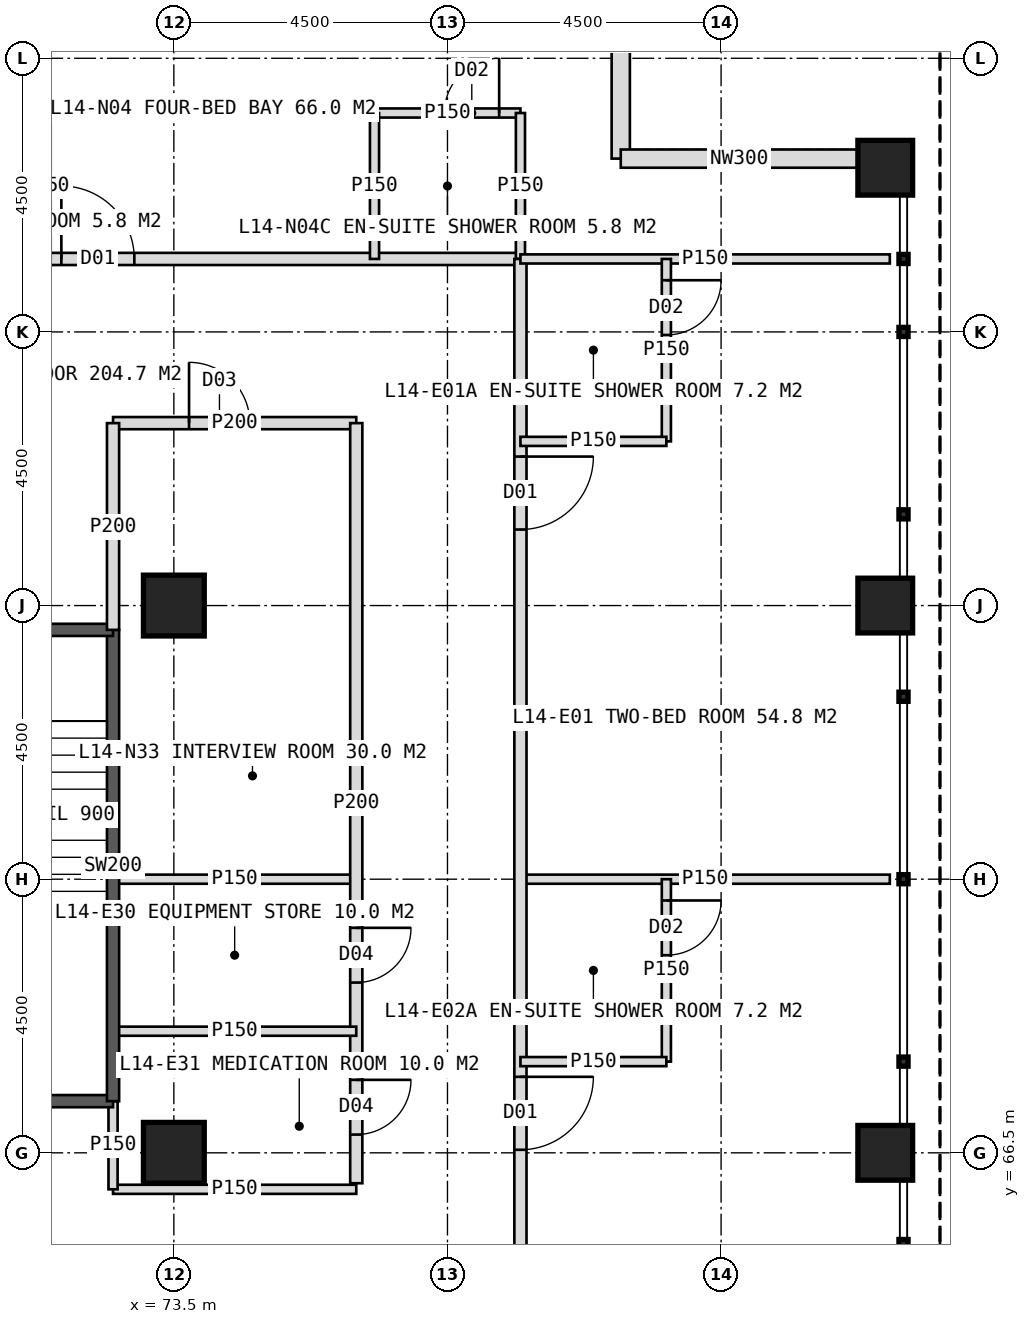
"""IFC4 building model, lengths in metres.
Left out: names, types, materials, properties, quantities, classifications, styles, units other than length and angle.
Written with IfcOpenShell. Run it as: python <this file> out.ifc"""

import sys

from ifc_helpers import new_model, si_unit, direction, frame, frame_2d, origin, origin_2d, place, context, subcontext, project, spatial, rectangle, hollow_rectangle, extrude, element, fill, save


model = new_model("IFC4")
c1 = context("Model", 3, precision=1e-05, world=origin(), true_north=direction((0.0, 1.0)))
c2 = subcontext(c1, "Body", "Model", "MODEL_VIEW")
j1 = project(units=[si_unit("LENGTHUNIT", "METRE"), si_unit("PLANEANGLEUNIT", "RADIAN")], contexts=[c1])
p1 = place(None, origin())
s1 = spatial("IfcSite", under=j1, at=p1, CompositionType="ELEMENT")
p2 = place(p1, origin())
s2 = spatial("IfcBuilding", under=s1, at=p2, CompositionType="ELEMENT")
p3 = place(p2, frame((0.0, 0.0, 63.0)))
s3 = spatial("IfcBuildingStorey", under=s2, at=p3, CompositionType="ELEMENT", Elevation=63.0)
for number, where, z_axis, x_axis in (
    (1, (73.5, 75.5, 0.0), (0.0, 0.0, 1.0), (1.0, 0.0, 0.0)),
    (2, (73.5, 66.5, 0.0), (0.0, 0.0, 1.0), (1.0, 0.0, 0.0)),
):
    element("IfcColumn", number, at=place(p3, frame(where, z_axis=z_axis, x_axis=x_axis)), inside=s3, PredefinedType="COLUMN", context=c2, shape_type="SweptSolid", body=[
        extrude(hollow_rectangle(XDim=1.0, YDim=1.0, WallThickness=0.1, at=origin_2d()), origin(), (0.0, 0.0, 1.0), 4.0),
    ])
for number, where, z_axis, x_axis in (
    (3, (85.2, 66.5, 0.0), (0.0, 0.0, 1.0), (1.0, 0.0, 0.0)),
    (4, (85.2, 75.5, 0.0), (0.0, 0.0, 1.0), (1.0, 0.0, 0.0)),
    (5, (85.2, 82.7, 0.0), (0.0, 0.0, 1.0), (1.0, 0.0, 0.0)),
):
    element("IfcColumn", number, at=place(p3, frame(where, z_axis=z_axis, x_axis=x_axis)), inside=s3, PredefinedType="COLUMN", context=c2, shape_type="SweptSolid", body=[
        extrude(hollow_rectangle(XDim=0.9, YDim=0.9, WallThickness=0.08, at=origin_2d()), origin(), (0.0, 0.0, 1.0), 4.0),
    ])
for number, where, z_axis, x_axis in (
    (6, (80.85, 86.75, 0.0), (0.0, 0.0, 1.0), (0.0, -1.0, 0.0)),
    (7, (80.85, 82.85, 0.0), (0.0, 0.0, 1.0), (1.0, 0.0, 0.0)),
):
    element("IfcWall", number, at=place(p3, frame(where, z_axis=z_axis, x_axis=x_axis)), inside=s3, PredefinedType="ELEMENTEDWALL", context=c2, shape_type="SweptSolid", body=[
        extrude(rectangle(XDim=3.9, YDim=0.3, at=frame_2d((1.95, 0.0))), origin(), (0.0, 0.0, 1.0), 2.95),
    ])
p4 = place(p3, frame((40.8, 81.2, 0.0), z_axis=(0.0, 0.0, 1.0), x_axis=(1.0, 0.0, 0.0)))
e8 = element("IfcWall", 8, at=p4, inside=s3, PredefinedType="PARTITIONING", context=c2, shape_type="SweptSolid", body=[
    extrude(rectangle(XDim=38.4, YDim=0.2, at=frame_2d((19.2, 0.0))), origin(), (0.0, 0.0, 1.0), 3.75),
])
p5 = place(p4, frame((4.5, 0.0, 0.0)))
e9 = element("IfcOpeningElement", 9, at=p5, cuts=e8, PredefinedType="OPENING", context=c2, shape_type="SweptSolid", body=[
    extrude(rectangle(XDim=1.2, YDim=2.2, at=frame_2d((0.6, 1.1))), frame((0.0, 0.11, 0.0), z_axis=(0.0, -1.0, 0.0), x_axis=(1.0, 0.0, 0.0)), (0.0, 0.0, 1.0), 0.22),
])
p6 = place(p4, frame((13.45, 0.0, 0.0)))
e10 = element("IfcOpeningElement", 10, at=p6, cuts=e8, PredefinedType="OPENING", context=c2, shape_type="SweptSolid", body=[
    extrude(rectangle(XDim=1.2, YDim=2.2, at=frame_2d((0.6, 1.1))), frame((0.0, 0.11, 0.0), z_axis=(0.0, -1.0, 0.0), x_axis=(1.0, 0.0, 0.0)), (0.0, 0.0, 1.0), 0.22),
])
p7 = place(p4, frame((22.45, 0.0, 0.0)))
e11 = element("IfcOpeningElement", 11, at=p7, cuts=e8, PredefinedType="OPENING", context=c2, shape_type="SweptSolid", body=[
    extrude(rectangle(XDim=1.2, YDim=2.2, at=frame_2d((0.6, 1.1))), frame((0.0, 0.11, 0.0), z_axis=(0.0, -1.0, 0.0), x_axis=(1.0, 0.0, 0.0)), (0.0, 0.0, 1.0), 0.22),
])
p8 = place(p4, frame((30.85, 0.0, 0.0)))
e12 = element("IfcOpeningElement", 12, at=p8, cuts=e8, PredefinedType="OPENING", context=c2, shape_type="SweptSolid", body=[
    extrude(rectangle(XDim=1.2, YDim=2.2, at=frame_2d((0.6, 1.1))), frame((0.0, 0.11, 0.0), z_axis=(0.0, -1.0, 0.0), x_axis=(1.0, 0.0, 0.0)), (0.0, 0.0, 1.0), 0.22),
])
p9 = place(p3, frame((76.8, 83.6, 0.0), z_axis=(0.0, 0.0, 1.0), x_axis=(1.0, 0.0, 0.0)))
e13 = element("IfcWall", 13, at=p9, inside=s3, PredefinedType="PARTITIONING", context=c2, shape_type="SweptSolid", body=[
    extrude(rectangle(XDim=2.4, YDim=0.15, at=frame_2d((1.2, 0.0))), origin(), (0.0, 0.0, 1.0), 3.75),
])
p10 = place(p9, frame((1.15, 0.0, 0.0)))
e14 = element("IfcOpeningElement", 14, at=p10, cuts=e13, PredefinedType="OPENING", context=c2, shape_type="SweptSolid", body=[
    extrude(rectangle(XDim=0.9, YDim=2.1, at=frame_2d((0.45, 1.05))), frame((0.0, 0.085, 0.0), z_axis=(0.0, -1.0, 0.0), x_axis=(1.0, 0.0, 0.0)), (0.0, 0.0, 1.0), 0.17),
])
for number, where, z_axis, x_axis in (
    (15, (76.8, 81.2, 0.0), (0.0, 0.0, 1.0), (0.0, 1.0, 0.0)),
    (16, (79.2, 81.2, 0.0), (0.0, 0.0, 1.0), (0.0, 1.0, 0.0)),
):
    element("IfcWall", number, at=place(p3, frame(where, z_axis=z_axis, x_axis=x_axis)), inside=s3, PredefinedType="PARTITIONING", context=c2, shape_type="SweptSolid", body=[
        extrude(rectangle(XDim=2.4, YDim=0.15, at=frame_2d((1.2, 0.0))), origin(), (0.0, 0.0, 1.0), 3.75),
    ])
p11 = place(p3, frame((72.5, 78.5, 0.0), z_axis=(0.0, 0.0, 1.0), x_axis=(1.0, 0.0, 0.0)))
e17 = element("IfcWall", 17, at=p11, inside=s3, PredefinedType="PARTITIONING", context=c2, shape_type="SweptSolid", body=[
    extrude(rectangle(XDim=4.0, YDim=0.2, at=frame_2d((2.0, 0.0))), origin(), (0.0, 0.0, 1.0), 3.75),
])
p12 = place(p11, frame((1.25, 0.0, 0.0)))
e18 = element("IfcOpeningElement", 18, at=p12, cuts=e17, PredefinedType="OPENING", context=c2, shape_type="SweptSolid", body=[
    extrude(rectangle(XDim=1.0, YDim=2.1, at=frame_2d((0.5, 1.05))), frame((0.0, 0.11, 0.0), z_axis=(0.0, -1.0, 0.0), x_axis=(1.0, 0.0, 0.0)), (0.0, 0.0, 1.0), 0.22),
])
p13 = place(p3, frame((79.2, 71.0, 0.0), z_axis=(0.0, 0.0, 1.0), x_axis=(1.0, 0.0, 0.0)))
e19 = element("IfcWall", 19, at=p13, inside=s3, PredefinedType="PARTITIONING", context=c2, shape_type="SweptSolid", body=[
    extrude(rectangle(XDim=6.075, YDim=0.15, at=frame_2d((3.038, 0.0))), origin(), (0.0, 0.0, 1.0), 3.75),
])
p14 = place(p3, frame((79.2, 81.2, 0.0), z_axis=(0.0, 0.0, 1.0), x_axis=(0.0, -1.0, 0.0)))
e20 = element("IfcWall", 20, at=p14, inside=s3, PredefinedType="PARTITIONING", context=c2, shape_type="SweptSolid", body=[
    extrude(rectangle(XDim=38.4, YDim=0.2, at=frame_2d((19.2, 0.0))), origin(), (0.0, 0.0, 1.0), 3.75),
])
p15 = place(p14, frame((3.25, 0.0, 0.0)))
e21 = element("IfcOpeningElement", 21, at=p15, cuts=e20, PredefinedType="OPENING", context=c2, shape_type="SweptSolid", body=[
    extrude(rectangle(XDim=1.2, YDim=2.2, at=frame_2d((0.6, 1.1))), frame((0.0, 0.11, 0.0), z_axis=(0.0, -1.0, 0.0), x_axis=(1.0, 0.0, 0.0)), (0.0, 0.0, 1.0), 0.22),
])
p16 = place(p14, frame((13.45, 0.0, 0.0)))
e22 = element("IfcOpeningElement", 22, at=p16, cuts=e20, PredefinedType="OPENING", context=c2, shape_type="SweptSolid", body=[
    extrude(rectangle(XDim=1.2, YDim=2.2, at=frame_2d((0.6, 1.1))), frame((0.0, 0.11, 0.0), z_axis=(0.0, -1.0, 0.0), x_axis=(1.0, 0.0, 0.0)), (0.0, 0.0, 1.0), 0.22),
])
p17 = place(p14, frame((21.85, 0.0, 0.0)))
e23 = element("IfcOpeningElement", 23, at=p17, cuts=e20, PredefinedType="OPENING", context=c2, shape_type="SweptSolid", body=[
    extrude(rectangle(XDim=1.2, YDim=2.2, at=frame_2d((0.6, 1.1))), frame((0.0, 0.11, 0.0), z_axis=(0.0, -1.0, 0.0), x_axis=(1.0, 0.0, 0.0)), (0.0, 0.0, 1.0), 0.22),
])
p18 = place(p14, frame((27.85, 0.0, 0.0)))
e24 = element("IfcOpeningElement", 24, at=p18, cuts=e20, PredefinedType="OPENING", context=c2, shape_type="SweptSolid", body=[
    extrude(rectangle(XDim=1.2, YDim=2.2, at=frame_2d((0.6, 1.1))), frame((0.0, 0.11, 0.0), z_axis=(0.0, -1.0, 0.0), x_axis=(1.0, 0.0, 0.0)), (0.0, 0.0, 1.0), 0.22),
])
p19 = place(p3, frame((79.2, 81.2, 0.0), z_axis=(0.0, 0.0, 1.0), x_axis=(1.0, 0.0, 0.0)))
e25 = element("IfcWall", 25, at=p19, inside=s3, PredefinedType="PARTITIONING", context=c2, shape_type="SweptSolid", body=[
    extrude(rectangle(XDim=6.075, YDim=0.15, at=frame_2d((3.038, 0.0))), origin(), (0.0, 0.0, 1.0), 3.75),
])
p20 = place(p3, frame((81.6, 81.2, 0.0), z_axis=(0.0, 0.0, 1.0), x_axis=(0.0, -1.0, 0.0)))
e26 = element("IfcWall", 26, at=p20, inside=s3, PredefinedType="PARTITIONING", context=c2, shape_type="SweptSolid", body=[
    extrude(rectangle(XDim=3.0, YDim=0.15, at=frame_2d((1.5, 0.0))), origin(), (0.0, 0.0, 1.0), 3.75),
])
p21 = place(p20, frame((0.35, 0.0, 0.0)))
e27 = element("IfcOpeningElement", 27, at=p21, cuts=e26, PredefinedType="OPENING", context=c2, shape_type="SweptSolid", body=[
    extrude(rectangle(XDim=0.9, YDim=2.1, at=frame_2d((0.45, 1.05))), frame((0.0, 0.085, 0.0), z_axis=(0.0, -1.0, 0.0), x_axis=(1.0, 0.0, 0.0)), (0.0, 0.0, 1.0), 0.17),
])
p22 = place(p3, frame((79.2, 78.2, 0.0), z_axis=(0.0, 0.0, 1.0), x_axis=(1.0, 0.0, 0.0)))
e28 = element("IfcWall", 28, at=p22, inside=s3, PredefinedType="PARTITIONING", context=c2, shape_type="SweptSolid", body=[
    extrude(rectangle(XDim=2.4, YDim=0.15, at=frame_2d((1.2, 0.0))), origin(), (0.0, 0.0, 1.0), 3.75),
])
p23 = place(p3, frame((81.6, 71.0, 0.0), z_axis=(0.0, 0.0, 1.0), x_axis=(0.0, -1.0, 0.0)))
e29 = element("IfcWall", 29, at=p23, inside=s3, PredefinedType="PARTITIONING", context=c2, shape_type="SweptSolid", body=[
    extrude(rectangle(XDim=3.0, YDim=0.15, at=frame_2d((1.5, 0.0))), origin(), (0.0, 0.0, 1.0), 3.75),
])
p24 = place(p23, frame((0.35, 0.0, 0.0)))
e30 = element("IfcOpeningElement", 30, at=p24, cuts=e29, PredefinedType="OPENING", context=c2, shape_type="SweptSolid", body=[
    extrude(rectangle(XDim=0.9, YDim=2.1, at=frame_2d((0.45, 1.05))), frame((0.0, 0.085, 0.0), z_axis=(0.0, -1.0, 0.0), x_axis=(1.0, 0.0, 0.0)), (0.0, 0.0, 1.0), 0.17),
])
p25 = place(p3, frame((79.2, 68.0, 0.0), z_axis=(0.0, 0.0, 1.0), x_axis=(1.0, 0.0, 0.0)))
e31 = element("IfcWall", 31, at=p25, inside=s3, PredefinedType="PARTITIONING", context=c2, shape_type="SweptSolid", body=[
    extrude(rectangle(XDim=2.4, YDim=0.15, at=frame_2d((1.2, 0.0))), origin(), (0.0, 0.0, 1.0), 3.75),
])
p26 = place(p3, frame((72.5, 71.0, 0.0), z_axis=(0.0, 0.0, 1.0), x_axis=(1.0, 0.0, 0.0)))
e32 = element("IfcWall", 32, at=p26, inside=s3, PredefinedType="PARTITIONING", context=c2, shape_type="SweptSolid", body=[
    extrude(rectangle(XDim=4.0, YDim=0.15, at=frame_2d((2.0, 0.0))), origin(), (0.0, 0.0, 1.0), 3.75),
])
p27 = place(p3, frame((76.5, 78.5, 0.0), z_axis=(0.0, 0.0, 1.0), x_axis=(0.0, -1.0, 0.0)))
e33 = element("IfcWall", 33, at=p27, inside=s3, PredefinedType="PARTITIONING", context=c2, shape_type="SweptSolid", body=[
    extrude(rectangle(XDim=12.5, YDim=0.2, at=frame_2d((6.25, 0.0))), origin(), (0.0, 0.0, 1.0), 3.75),
])
p28 = place(p27, frame((8.3, 0.0, 0.0)))
e34 = element("IfcOpeningElement", 34, at=p28, cuts=e33, PredefinedType="OPENING", context=c2, shape_type="SweptSolid", body=[
    extrude(rectangle(XDim=0.9, YDim=2.1, at=frame_2d((0.45, 1.05))), frame((0.0, 0.11, 0.0), z_axis=(0.0, -1.0, 0.0), x_axis=(1.0, 0.0, 0.0)), (0.0, 0.0, 1.0), 0.22),
])
p29 = place(p27, frame((10.8, 0.0, 0.0)))
e35 = element("IfcOpeningElement", 35, at=p29, cuts=e33, PredefinedType="OPENING", context=c2, shape_type="SweptSolid", body=[
    extrude(rectangle(XDim=0.9, YDim=2.1, at=frame_2d((0.45, 1.05))), frame((0.0, 0.11, 0.0), z_axis=(0.0, -1.0, 0.0), x_axis=(1.0, 0.0, 0.0)), (0.0, 0.0, 1.0), 0.22),
])
for number, where, z_axis, x_axis in (
    (36, (72.5, 65.9, 0.0), (0.0, 0.0, 1.0), (1.0, 0.0, 0.0)),
    (37, (72.5, 68.5, 0.0), (0.0, 0.0, 1.0), (1.0, 0.0, 0.0)),
):
    element("IfcWall", number, at=place(p3, frame(where, z_axis=z_axis, x_axis=x_axis)), inside=s3, PredefinedType="PARTITIONING", context=c2, shape_type="SweptSolid", body=[
        extrude(rectangle(XDim=4.0, YDim=0.15, at=frame_2d((2.0, 0.0))), origin(), (0.0, 0.0, 1.0), 3.75),
    ])
p30 = place(p3, frame((72.5, 65.9, 0.0), z_axis=(0.0, 0.0, 1.0), x_axis=(0.0, 1.0, 0.0)))
e38 = element("IfcWall", 38, at=p30, inside=s3, PredefinedType="PARTITIONING", context=c2, shape_type="SweptSolid", body=[
    extrude(rectangle(XDim=1.45, YDim=0.15, at=frame_2d((0.725, 0.0))), origin(), (0.0, 0.0, 1.0), 3.75),
])
p31 = place(p3, frame((69.0, 67.35, 0.0), z_axis=(0.0, 0.0, 1.0), x_axis=(1.0, 0.0, 0.0)))
e39 = element("IfcWall", 39, at=p31, inside=s3, PredefinedType="SOLIDWALL", context=c2, shape_type="SweptSolid", body=[
    extrude(rectangle(XDim=3.5, YDim=0.2, at=frame_2d((1.75, 0.0))), origin(), (0.0, 0.0, 1.0), 3.75),
])
p32 = place(p3, frame((72.5, 67.35, 0.0), z_axis=(0.0, 0.0, 1.0), x_axis=(0.0, 1.0, 0.0)))
e40 = element("IfcWall", 40, at=p32, inside=s3, PredefinedType="SOLIDWALL", context=c2, shape_type="SweptSolid", body=[
    extrude(rectangle(XDim=7.75, YDim=0.2, at=frame_2d((3.875, 0.0))), origin(), (0.0, 0.0, 1.0), 3.75),
])
p33 = place(p3, frame((69.0, 75.1, 0.0), z_axis=(0.0, 0.0, 1.0), x_axis=(1.0, 0.0, 0.0)))
e41 = element("IfcWall", 41, at=p33, inside=s3, PredefinedType="SOLIDWALL", context=c2, shape_type="SweptSolid", body=[
    extrude(rectangle(XDim=3.5, YDim=0.2, at=frame_2d((1.75, 0.0))), origin(), (0.0, 0.0, 1.0), 3.75),
])
p34 = place(p33, frame((1.15, 0.0, 0.0)))
e42 = element("IfcOpeningElement", 42, at=p34, cuts=e41, PredefinedType="OPENING", context=c2, shape_type="SweptSolid", body=[
    extrude(rectangle(XDim=1.2, YDim=2.1, at=frame_2d((0.6, 1.05))), frame((0.0, 0.11, 0.0), z_axis=(0.0, -1.0, 0.0), x_axis=(1.0, 0.0, 0.0)), (0.0, 0.0, 1.0), 0.22),
])
p35 = place(p3, frame((72.5, 75.1, 0.0), z_axis=(0.0, 0.0, 1.0), x_axis=(0.0, 1.0, 0.0)))
e43 = element("IfcWall", 43, at=p35, inside=s3, PredefinedType="PARTITIONING", context=c2, shape_type="SweptSolid", body=[
    extrude(rectangle(XDim=3.4, YDim=0.2, at=frame_2d((1.7, 0.0))), origin(), (0.0, 0.0, 1.0), 3.75),
])
p36 = place(p8, origin())
e44 = element("IfcDoor", 44, at=p36, inside=s3, OperationType="SINGLE_SWING_LEFT", PredefinedType="DOOR", context=c2, shape_type="SweptSolid", body=[
    extrude(rectangle(XDim=1.2, YDim=2.2, at=frame_2d((0.6, 1.1))), frame((0.0, 0.025, 0.0), z_axis=(0.0, -1.0, 0.0), x_axis=(1.0, 0.0, 0.0)), (0.0, 0.0, 1.0), 0.05),
])
fill(e12, e44)
p37 = place(p10, origin())
e45 = element("IfcDoor", 45, at=p37, inside=s3, OperationType="SINGLE_SWING_RIGHT", PredefinedType="DOOR", context=c2, shape_type="SweptSolid", body=[
    extrude(rectangle(XDim=0.9, YDim=2.1, at=frame_2d((0.45, 1.05))), frame((0.0, 0.025, 0.0), z_axis=(0.0, -1.0, 0.0), x_axis=(1.0, 0.0, 0.0)), (0.0, 0.0, 1.0), 0.05),
])
fill(e14, e45)
p38 = place(p12, origin())
e46 = element("IfcDoor", 46, at=p38, inside=s3, OperationType="SINGLE_SWING_LEFT", PredefinedType="DOOR", context=c2, shape_type="SweptSolid", body=[
    extrude(rectangle(XDim=1.0, YDim=2.1, at=frame_2d((0.5, 1.05))), frame((0.0, 0.025, 0.0), z_axis=(0.0, -1.0, 0.0), x_axis=(1.0, 0.0, 0.0)), (0.0, 0.0, 1.0), 0.05),
])
fill(e18, e46)
p39 = place(p15, origin())
e47 = element("IfcDoor", 47, at=p39, inside=s3, OperationType="SINGLE_SWING_LEFT", PredefinedType="DOOR", context=c2, shape_type="SweptSolid", body=[
    extrude(rectangle(XDim=1.2, YDim=2.2, at=frame_2d((0.6, 1.1))), frame((0.0, 0.025, 0.0), z_axis=(0.0, -1.0, 0.0), x_axis=(1.0, 0.0, 0.0)), (0.0, 0.0, 1.0), 0.05),
])
fill(e21, e47)
p40 = place(p21, origin())
e48 = element("IfcDoor", 48, at=p40, inside=s3, OperationType="SINGLE_SWING_LEFT", PredefinedType="DOOR", context=c2, shape_type="SweptSolid", body=[
    extrude(rectangle(XDim=0.9, YDim=2.1, at=frame_2d((0.45, 1.05))), frame((0.0, 0.025, 0.0), z_axis=(0.0, -1.0, 0.0), x_axis=(1.0, 0.0, 0.0)), (0.0, 0.0, 1.0), 0.05),
])
fill(e27, e48)
p41 = place(p16, origin())
e49 = element("IfcDoor", 49, at=p41, inside=s3, OperationType="SINGLE_SWING_LEFT", PredefinedType="DOOR", context=c2, shape_type="SweptSolid", body=[
    extrude(rectangle(XDim=1.2, YDim=2.2, at=frame_2d((0.6, 1.1))), frame((0.0, 0.025, 0.0), z_axis=(0.0, -1.0, 0.0), x_axis=(1.0, 0.0, 0.0)), (0.0, 0.0, 1.0), 0.05),
])
fill(e22, e49)
p42 = place(p24, origin())
e50 = element("IfcDoor", 50, at=p42, inside=s3, OperationType="SINGLE_SWING_LEFT", PredefinedType="DOOR", context=c2, shape_type="SweptSolid", body=[
    extrude(rectangle(XDim=0.9, YDim=2.1, at=frame_2d((0.45, 1.05))), frame((0.0, 0.025, 0.0), z_axis=(0.0, -1.0, 0.0), x_axis=(1.0, 0.0, 0.0)), (0.0, 0.0, 1.0), 0.05),
])
fill(e30, e50)
p43 = place(p28, origin())
e51 = element("IfcDoor", 51, at=p43, inside=s3, OperationType="SINGLE_SWING_LEFT", PredefinedType="DOOR", context=c2, shape_type="SweptSolid", body=[
    extrude(rectangle(XDim=0.9, YDim=2.1, at=frame_2d((0.45, 1.05))), frame((0.0, 0.025, 0.0), z_axis=(0.0, -1.0, 0.0), x_axis=(1.0, 0.0, 0.0)), (0.0, 0.0, 1.0), 0.05),
])
fill(e34, e51)
p44 = place(p29, origin())
e52 = element("IfcDoor", 52, at=p44, inside=s3, OperationType="SINGLE_SWING_LEFT", PredefinedType="DOOR", context=c2, shape_type="SweptSolid", body=[
    extrude(rectangle(XDim=0.9, YDim=2.1, at=frame_2d((0.45, 1.05))), frame((0.0, 0.025, 0.0), z_axis=(0.0, -1.0, 0.0), x_axis=(1.0, 0.0, 0.0)), (0.0, 0.0, 1.0), 0.05),
])
fill(e35, e52)
save(model, sys.argv[1])
